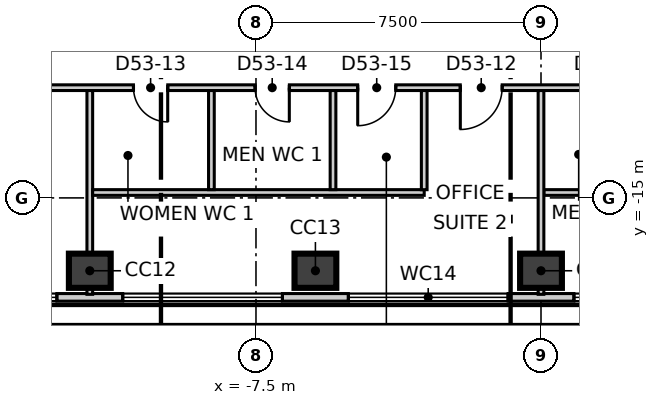
"""IFC4 building model, lengths in metres.
Left out: names, types, materials, properties, quantities, classifications, styles, units other than length and angle.
Written with IfcOpenShell. Run it as: python <this file> out.ifc"""

import sys

from ifc_helpers import new_model, si_unit, direction, frame, frame_2d, origin, origin_2d, place, context, subcontext, project, spatial, rectangle, extrude, element, fill, save


model = new_model("IFC4")
c1 = context("Model", 3, precision=1e-05, world=origin(), true_north=direction((0.0, 1.0)))
c2 = subcontext(c1, "Body", "Model", "MODEL_VIEW")
j1 = project(units=[si_unit("LENGTHUNIT", "METRE"), si_unit("PLANEANGLEUNIT", "RADIAN")], contexts=[c1])
p1 = place(None, origin())
s1 = spatial("IfcSite", under=j1, at=p1, CompositionType="ELEMENT")
p2 = place(p1, origin())
s2 = spatial("IfcBuilding", under=s1, at=p2, CompositionType="ELEMENT")
p3 = place(p2, frame((0.0, 0.0, 227.3)))
s3 = spatial("IfcBuildingStorey", under=s2, at=p3, CompositionType="ELEMENT", Elevation=227.3)
for number, where, z_axis, x_axis in (
    (1, (-11.873, -16.917, -0.3), (0.0, 0.0, 1.0), (1.0, 0.0, 0.0)),
    (2, (-5.936, -16.917, -0.3), (0.0, 0.0, 1.0), (1.0, 0.0, 0.0)),
    (3, (0.0, -16.917, -0.3), (0.0, 0.0, 1.0), (1.0, 0.0, 0.0)),
):
    element("IfcColumn", number, at=place(p3, frame(where, z_axis=z_axis, x_axis=x_axis)), inside=s3, PredefinedType="COLUMN", context=c2, shape_type="SweptSolid", body=[
        extrude(rectangle(XDim=1.1, YDim=0.9, at=origin_2d()), origin(), (0.0, 0.0, 1.0), 4.0),
    ])
p4 = place(p3, frame((-2.732, 30.501, 0.0), z_axis=(0.0, 0.0, 1.0), x_axis=(-0.500023345841, -0.866011924637, 0.0)))
e4 = element("IfcWall", 4, at=p4, inside=s3, PredefinedType="ELEMENTEDWALL", context=c2, shape_type="SweptSolid", body=[
    extrude(rectangle(XDim=50.078, YDim=0.2, at=frame_2d((25.039, 0.0))), origin(), (0.0, 0.0, 1.0), 3.7),
])
p5 = place(p4, frame((2.171, 0.0, 0.9)))
e5 = element("IfcOpeningElement", 5, at=p5, cuts=e4, PredefinedType="OPENING", context=c2, shape_type="SweptSolid", body=[
    extrude(rectangle(XDim=4.2, YDim=2.5, at=frame_2d((2.1, 1.25))), frame((0.0, 0.11, 0.0), z_axis=(0.0, -1.0, 0.0), x_axis=(1.0, 0.0, 0.0)), (0.0, 0.0, 1.0), 0.22),
])
p6 = place(p4, frame((8.107, 0.0, 0.9)))
e6 = element("IfcOpeningElement", 6, at=p6, cuts=e4, PredefinedType="OPENING", context=c2, shape_type="SweptSolid", body=[
    extrude(rectangle(XDim=4.2, YDim=2.5, at=frame_2d((2.1, 1.25))), frame((0.0, 0.11, 0.0), z_axis=(0.0, -1.0, 0.0), x_axis=(1.0, 0.0, 0.0)), (0.0, 0.0, 1.0), 0.22),
])
p7 = place(p4, frame((14.044, 0.0, 0.9)))
e7 = element("IfcOpeningElement", 7, at=p7, cuts=e4, PredefinedType="OPENING", context=c2, shape_type="SweptSolid", body=[
    extrude(rectangle(XDim=4.2, YDim=2.5, at=frame_2d((2.1, 1.25))), frame((0.0, 0.11, 0.0), z_axis=(0.0, -1.0, 0.0), x_axis=(1.0, 0.0, 0.0)), (0.0, 0.0, 1.0), 0.22),
])
p8 = place(p4, frame((19.98, 0.0, 0.9)))
e8 = element("IfcOpeningElement", 8, at=p8, cuts=e4, PredefinedType="OPENING", context=c2, shape_type="SweptSolid", body=[
    extrude(rectangle(XDim=4.2, YDim=2.5, at=frame_2d((2.1, 1.25))), frame((0.0, 0.11, 0.0), z_axis=(0.0, -1.0, 0.0), x_axis=(1.0, 0.0, 0.0)), (0.0, 0.0, 1.0), 0.22),
])
p9 = place(p4, frame((25.917, 0.0, 0.9)))
e9 = element("IfcOpeningElement", 9, at=p9, cuts=e4, PredefinedType="OPENING", context=c2, shape_type="SweptSolid", body=[
    extrude(rectangle(XDim=4.2, YDim=2.5, at=frame_2d((2.1, 1.25))), frame((0.0, 0.11, 0.0), z_axis=(0.0, -1.0, 0.0), x_axis=(1.0, 0.0, 0.0)), (0.0, 0.0, 1.0), 0.22),
])
p10 = place(p4, frame((31.853, 0.0, 0.9)))
e10 = element("IfcOpeningElement", 10, at=p10, cuts=e4, PredefinedType="OPENING", context=c2, shape_type="SweptSolid", body=[
    extrude(rectangle(XDim=4.2, YDim=2.5, at=frame_2d((2.1, 1.25))), frame((0.0, 0.11, 0.0), z_axis=(0.0, -1.0, 0.0), x_axis=(1.0, 0.0, 0.0)), (0.0, 0.0, 1.0), 0.22),
])
p11 = place(p4, frame((37.79, 0.0, 0.9)))
e11 = element("IfcOpeningElement", 11, at=p11, cuts=e4, PredefinedType="OPENING", context=c2, shape_type="SweptSolid", body=[
    extrude(rectangle(XDim=4.2, YDim=2.5, at=frame_2d((2.1, 1.25))), frame((0.0, 0.11, 0.0), z_axis=(0.0, -1.0, 0.0), x_axis=(1.0, 0.0, 0.0)), (0.0, 0.0, 1.0), 0.22),
])
p12 = place(p4, frame((43.726, 0.0, 0.9)))
e12 = element("IfcOpeningElement", 12, at=p12, cuts=e4, PredefinedType="OPENING", context=c2, shape_type="SweptSolid", body=[
    extrude(rectangle(XDim=4.2, YDim=2.5, at=frame_2d((2.1, 1.25))), frame((0.0, 0.11, 0.0), z_axis=(0.0, -1.0, 0.0), x_axis=(1.0, 0.0, 0.0)), (0.0, 0.0, 1.0), 0.22),
])
p13 = place(p3, frame((-25.049, -17.617, 0.0), z_axis=(0.0, 0.0, 1.0), x_axis=(1.0, 0.0, 0.0)))
e13 = element("IfcWall", 13, at=p13, inside=s3, PredefinedType="ELEMENTEDWALL", context=c2, shape_type="SweptSolid", body=[
    extrude(rectangle(XDim=50.078, YDim=0.2, at=frame_2d((25.039, 0.0))), origin(), (0.0, 0.0, 1.0), 3.7),
])
p14 = place(p13, frame((2.171, 0.0, 0.9)))
e14 = element("IfcOpeningElement", 14, at=p14, cuts=e13, PredefinedType="OPENING", context=c2, shape_type="SweptSolid", body=[
    extrude(rectangle(XDim=4.2, YDim=2.5, at=frame_2d((2.1, 1.25))), frame((0.0, 0.11, 0.0), z_axis=(0.0, -1.0, 0.0), x_axis=(1.0, 0.0, 0.0)), (0.0, 0.0, 1.0), 0.22),
])
p15 = place(p13, frame((8.108, 0.0, 0.9)))
e15 = element("IfcOpeningElement", 15, at=p15, cuts=e13, PredefinedType="OPENING", context=c2, shape_type="SweptSolid", body=[
    extrude(rectangle(XDim=4.2, YDim=2.5, at=frame_2d((2.1, 1.25))), frame((0.0, 0.11, 0.0), z_axis=(0.0, -1.0, 0.0), x_axis=(1.0, 0.0, 0.0)), (0.0, 0.0, 1.0), 0.22),
])
p16 = place(p13, frame((14.044, 0.0, 0.9)))
e16 = element("IfcOpeningElement", 16, at=p16, cuts=e13, PredefinedType="OPENING", context=c2, shape_type="SweptSolid", body=[
    extrude(rectangle(XDim=4.2, YDim=2.5, at=frame_2d((2.1, 1.25))), frame((0.0, 0.11, 0.0), z_axis=(0.0, -1.0, 0.0), x_axis=(1.0, 0.0, 0.0)), (0.0, 0.0, 1.0), 0.22),
])
p17 = place(p13, frame((19.981, 0.0, 0.9)))
e17 = element("IfcOpeningElement", 17, at=p17, cuts=e13, PredefinedType="OPENING", context=c2, shape_type="SweptSolid", body=[
    extrude(rectangle(XDim=4.2, YDim=2.5, at=frame_2d((2.1, 1.25))), frame((0.0, 0.11, 0.0), z_axis=(0.0, -1.0, 0.0), x_axis=(1.0, 0.0, 0.0)), (0.0, 0.0, 1.0), 0.22),
])
p18 = place(p13, frame((25.917, 0.0, 0.9)))
e18 = element("IfcOpeningElement", 18, at=p18, cuts=e13, PredefinedType="OPENING", context=c2, shape_type="SweptSolid", body=[
    extrude(rectangle(XDim=4.2, YDim=2.5, at=frame_2d((2.1, 1.25))), frame((0.0, 0.11, 0.0), z_axis=(0.0, -1.0, 0.0), x_axis=(1.0, 0.0, 0.0)), (0.0, 0.0, 1.0), 0.22),
])
p19 = place(p13, frame((31.854, 0.0, 0.9)))
e19 = element("IfcOpeningElement", 19, at=p19, cuts=e13, PredefinedType="OPENING", context=c2, shape_type="SweptSolid", body=[
    extrude(rectangle(XDim=4.2, YDim=2.5, at=frame_2d((2.1, 1.25))), frame((0.0, 0.11, 0.0), z_axis=(0.0, -1.0, 0.0), x_axis=(1.0, 0.0, 0.0)), (0.0, 0.0, 1.0), 0.22),
])
p20 = place(p13, frame((37.79, 0.0, 0.9)))
e20 = element("IfcOpeningElement", 20, at=p20, cuts=e13, PredefinedType="OPENING", context=c2, shape_type="SweptSolid", body=[
    extrude(rectangle(XDim=4.2, YDim=2.5, at=frame_2d((2.1, 1.25))), frame((0.0, 0.11, 0.0), z_axis=(0.0, -1.0, 0.0), x_axis=(1.0, 0.0, 0.0)), (0.0, 0.0, 1.0), 0.22),
])
p21 = place(p13, frame((43.727, 0.0, 0.9)))
e21 = element("IfcOpeningElement", 21, at=p21, cuts=e13, PredefinedType="OPENING", context=c2, shape_type="SweptSolid", body=[
    extrude(rectangle(XDim=4.2, YDim=2.5, at=frame_2d((2.1, 1.25))), frame((0.0, 0.11, 0.0), z_axis=(0.0, -1.0, 0.0), x_axis=(1.0, 0.0, 0.0)), (0.0, 0.0, 1.0), 0.22),
])
p22 = place(p3, frame((-20.882, -11.969, 0.0), z_axis=(0.0, 0.0, 1.0), x_axis=(0.499998738735, 0.866026131975, 0.0)))
e22 = element("IfcWall", 22, at=p22, inside=s3, PredefinedType="PARTITIONING", context=c2, shape_type="SweptSolid", body=[
    extrude(rectangle(XDim=41.764, YDim=0.15, at=frame_2d((20.882, 0.0))), origin(), (0.0, 0.0, 1.0), 3.7),
])
p23 = place(p22, frame((33.714, 0.0, 0.0)))
e23 = element("IfcOpeningElement", 23, at=p23, cuts=e22, PredefinedType="OPENING", context=c2, shape_type="SweptSolid", body=[
    extrude(rectangle(XDim=1.1, YDim=2.1, at=frame_2d((0.55, 1.05))), frame((0.0, 0.085, 0.0), z_axis=(0.0, -1.0, 0.0), x_axis=(1.0, 0.0, 0.0)), (0.0, 0.0, 1.0), 0.17),
])
p24 = place(p22, frame((23.293, 0.0, 0.0)))
e24 = element("IfcOpeningElement", 24, at=p24, cuts=e22, PredefinedType="OPENING", context=c2, shape_type="SweptSolid", body=[
    extrude(rectangle(XDim=1.0, YDim=2.1, at=frame_2d((0.5, 1.05))), frame((0.0, 0.085, 0.0), z_axis=(0.0, -1.0, 0.0), x_axis=(1.0, 0.0, 0.0)), (0.0, 0.0, 1.0), 0.17),
])
p25 = place(p22, frame((13.356, 0.0, 0.0)))
e25 = element("IfcOpeningElement", 25, at=p25, cuts=e22, PredefinedType="OPENING", context=c2, shape_type="SweptSolid", body=[
    extrude(rectangle(XDim=1.1, YDim=2.1, at=frame_2d((0.55, 1.05))), frame((0.0, 0.085, 0.0), z_axis=(0.0, -1.0, 0.0), x_axis=(1.0, 0.0, 0.0)), (0.0, 0.0, 1.0), 0.17),
])
p26 = place(p22, frame((18.556, 0.0, 0.0)))
e26 = element("IfcOpeningElement", 26, at=p26, cuts=e22, PredefinedType="OPENING", context=c2, shape_type="SweptSolid", body=[
    extrude(rectangle(XDim=0.9, YDim=2.1, at=frame_2d((0.45, 1.05))), frame((0.0, 0.085, 0.0), z_axis=(0.0, -1.0, 0.0), x_axis=(1.0, 0.0, 0.0)), (0.0, 0.0, 1.0), 0.17),
])
p27 = place(p22, frame((15.556, 0.0, 0.0)))
e27 = element("IfcOpeningElement", 27, at=p27, cuts=e22, PredefinedType="OPENING", context=c2, shape_type="SweptSolid", body=[
    extrude(rectangle(XDim=0.9, YDim=2.1, at=frame_2d((0.45, 1.05))), frame((0.0, 0.085, 0.0), z_axis=(0.0, -1.0, 0.0), x_axis=(1.0, 0.0, 0.0)), (0.0, 0.0, 1.0), 0.17),
])
p28 = place(p22, frame((3.883, 0.0, 0.0)))
e28 = element("IfcOpeningElement", 28, at=p28, cuts=e22, PredefinedType="OPENING", context=c2, shape_type="SweptSolid", body=[
    extrude(rectangle(XDim=1.1, YDim=2.1, at=frame_2d((0.55, 1.05))), frame((0.0, 0.085, 0.0), z_axis=(0.0, -1.0, 0.0), x_axis=(1.0, 0.0, 0.0)), (0.0, 0.0, 1.0), 0.17),
])
p29 = place(p3, frame((-20.808, -12.1, 0.0), z_axis=(0.0, 0.0, 1.0), x_axis=(1.0, 0.0, 0.0)))
e29 = element("IfcWall", 29, at=p29, inside=s3, PredefinedType="PARTITIONING", context=c2, shape_type="SweptSolid", body=[
    extrude(rectangle(XDim=41.766, YDim=0.15, at=frame_2d((20.883, 0.0))), origin(), (0.0, 0.0, 1.0), 3.7),
])
p30 = place(p29, frame((3.8, 0.0, 0.0)))
e30 = element("IfcOpeningElement", 30, at=p30, cuts=e29, PredefinedType="OPENING", context=c2, shape_type="SweptSolid", body=[
    extrude(rectangle(XDim=1.1, YDim=2.1, at=frame_2d((0.55, 1.05))), frame((0.0, 0.085, 0.0), z_axis=(0.0, -1.0, 0.0), x_axis=(1.0, 0.0, 0.0)), (0.0, 0.0, 1.0), 0.17),
])
p31 = place(p29, frame((18.685, 0.0, 0.0)))
e31 = element("IfcOpeningElement", 31, at=p31, cuts=e29, PredefinedType="OPENING", context=c2, shape_type="SweptSolid", body=[
    extrude(rectangle(XDim=1.1, YDim=2.1, at=frame_2d((0.55, 1.05))), frame((0.0, 0.085, 0.0), z_axis=(0.0, -1.0, 0.0), x_axis=(1.0, 0.0, 0.0)), (0.0, 0.0, 1.0), 0.17),
])
p32 = place(p29, frame((10.085, 0.0, 0.0)))
e32 = element("IfcOpeningElement", 32, at=p32, cuts=e29, PredefinedType="OPENING", context=c2, shape_type="SweptSolid", body=[
    extrude(rectangle(XDim=0.9, YDim=2.1, at=frame_2d((0.45, 1.05))), frame((0.0, 0.085, 0.0), z_axis=(0.0, -1.0, 0.0), x_axis=(1.0, 0.0, 0.0)), (0.0, 0.0, 1.0), 0.17),
])
p33 = place(p29, frame((13.285, 0.0, 0.0)))
e33 = element("IfcOpeningElement", 33, at=p33, cuts=e29, PredefinedType="OPENING", context=c2, shape_type="SweptSolid", body=[
    extrude(rectangle(XDim=0.9, YDim=2.1, at=frame_2d((0.45, 1.05))), frame((0.0, 0.085, 0.0), z_axis=(0.0, -1.0, 0.0), x_axis=(1.0, 0.0, 0.0)), (0.0, 0.0, 1.0), 0.17),
])
p34 = place(p29, frame((15.985, 0.0, 0.0)))
e34 = element("IfcOpeningElement", 34, at=p34, cuts=e29, PredefinedType="OPENING", context=c2, shape_type="SweptSolid", body=[
    extrude(rectangle(XDim=1.0, YDim=2.1, at=frame_2d((0.5, 1.05))), frame((0.0, 0.085, 0.0), z_axis=(0.0, -1.0, 0.0), x_axis=(1.0, 0.0, 0.0)), (0.0, 0.0, 1.0), 0.17),
])
p35 = place(p29, frame((29.158, 0.0, 0.0)))
e35 = element("IfcOpeningElement", 35, at=p35, cuts=e29, PredefinedType="OPENING", context=c2, shape_type="SweptSolid", body=[
    extrude(rectangle(XDim=1.1, YDim=2.1, at=frame_2d((0.55, 1.05))), frame((0.0, 0.085, 0.0), z_axis=(0.0, -1.0, 0.0), x_axis=(1.0, 0.0, 0.0)), (0.0, 0.0, 1.0), 0.17),
])
p36 = place(p29, frame((22.158, 0.0, 0.0)))
e36 = element("IfcOpeningElement", 36, at=p36, cuts=e29, PredefinedType="OPENING", context=c2, shape_type="SweptSolid", body=[
    extrude(rectangle(XDim=0.9, YDim=2.1, at=frame_2d((0.45, 1.05))), frame((0.0, 0.085, 0.0), z_axis=(0.0, -1.0, 0.0), x_axis=(1.0, 0.0, 0.0)), (0.0, 0.0, 1.0), 0.17),
])
p37 = place(p29, frame((25.158, 0.0, 0.0)))
e37 = element("IfcOpeningElement", 37, at=p37, cuts=e29, PredefinedType="OPENING", context=c2, shape_type="SweptSolid", body=[
    extrude(rectangle(XDim=0.9, YDim=2.1, at=frame_2d((0.45, 1.05))), frame((0.0, 0.085, 0.0), z_axis=(0.0, -1.0, 0.0), x_axis=(1.0, 0.0, 0.0)), (0.0, 0.0, 1.0), 0.17),
])
p38 = place(p29, frame((36.731, 0.0, 0.0)))
e38 = element("IfcOpeningElement", 38, at=p38, cuts=e29, PredefinedType="OPENING", context=c2, shape_type="SweptSolid", body=[
    extrude(rectangle(XDim=1.0, YDim=2.1, at=frame_2d((0.5, 1.05))), frame((0.0, 0.085, 0.0), z_axis=(0.0, -1.0, 0.0), x_axis=(1.0, 0.0, 0.0)), (0.0, 0.0, 1.0), 0.17),
])
p39 = place(p3, frame((-11.873, -17.537, 0.0), z_axis=(0.0, 0.0, 1.0), x_axis=(0.0, 1.0, 0.0)))
e39 = element("IfcWall", 39, at=p39, inside=s3, PredefinedType="PARTITIONING", context=c2, shape_type="SweptSolid", body=[
    extrude(rectangle(XDim=5.362, YDim=0.15, at=frame_2d((2.681, 0.0))), origin(), (0.0, 0.0, 1.0), 3.7),
])
p40 = place(p3, frame((-11.798, -14.858, 0.0), z_axis=(0.0, 0.0, 1.0), x_axis=(1.0, 0.0, 0.0)))
e40 = element("IfcWall", 40, at=p40, inside=s3, PredefinedType="PARTITIONING", context=c2, shape_type="SweptSolid", body=[
    extrude(rectangle(XDim=8.725, YDim=0.15, at=frame_2d((4.363, 0.0))), origin(), (0.0, 0.0, 1.0), 3.7),
])
p41 = place(p3, frame((0.075, -14.858, 0.0), z_axis=(0.0, 0.0, 1.0), x_axis=(1.0, 0.0, 0.0)))
e41 = element("IfcWall", 41, at=p41, inside=s3, PredefinedType="PARTITIONING", context=c2, shape_type="SweptSolid", body=[
    extrude(rectangle(XDim=5.925, YDim=0.15, at=frame_2d((2.962, 0.0))), origin(), (0.0, 0.0, 1.0), 3.7),
])
p42 = place(p3, frame((-8.673, -14.783, 0.0), z_axis=(0.0, 0.0, 1.0), x_axis=(0.0, 1.0, 0.0)))
e42 = element("IfcWall", 42, at=p42, inside=s3, PredefinedType="PARTITIONING", context=c2, shape_type="SweptSolid", body=[
    extrude(rectangle(XDim=2.608, YDim=0.15, at=frame_2d((1.304, 0.0))), origin(), (0.0, 0.0, 1.0), 3.7),
])
p43 = place(p3, frame((-3.073, -14.784, 0.0), z_axis=(0.0, 0.0, 1.0), x_axis=(0.0, 1.0, 0.0)))
e43 = element("IfcWall", 43, at=p43, inside=s3, PredefinedType="PARTITIONING", context=c2, shape_type="SweptSolid", body=[
    extrude(rectangle(XDim=2.609, YDim=0.15, at=frame_2d((1.304, 0.0))), origin(), (0.0, 0.0, 1.0), 3.7),
])
p44 = place(p3, frame((-5.473, -14.783, 0.0), z_axis=(0.0, 0.0, 1.0), x_axis=(0.0, 1.0, 0.0)))
e44 = element("IfcWall", 44, at=p44, inside=s3, PredefinedType="PARTITIONING", context=c2, shape_type="SweptSolid", body=[
    extrude(rectangle(XDim=2.608, YDim=0.15, at=frame_2d((1.304, 0.0))), origin(), (0.0, 0.0, 1.0), 3.7),
])
p45 = place(p3, frame((0.0, -17.537, 0.0), z_axis=(0.0, 0.0, 1.0), x_axis=(0.0, 1.0, 0.0)))
e45 = element("IfcWall", 45, at=p45, inside=s3, PredefinedType="PARTITIONING", context=c2, shape_type="SweptSolid", body=[
    extrude(rectangle(XDim=5.362, YDim=0.15, at=frame_2d((2.681, 0.0))), origin(), (0.0, 0.0, 1.0), 3.2),
])
p46 = place(p3, frame((0.075, 24.07, 0.0), z_axis=(0.0, 0.0, 1.0), x_axis=(0.49999939571, -0.866025752671, 0.0)))
e46 = element("IfcWall", 46, at=p46, inside=s3, PredefinedType="PARTITIONING", context=c2, shape_type="SweptSolid", body=[
    extrude(rectangle(XDim=41.614, YDim=0.15, at=frame_2d((20.807, 0.0))), origin(), (0.0, 0.0, 1.0), 3.7),
])
p47 = place(p46, frame((36.714, 0.0, 0.0)))
e47 = element("IfcOpeningElement", 47, at=p47, cuts=e46, PredefinedType="OPENING", context=c2, shape_type="SweptSolid", body=[
    extrude(rectangle(XDim=1.1, YDim=2.1, at=frame_2d((0.55, 1.05))), frame((0.0, 0.085, 0.0), z_axis=(0.0, -1.0, 0.0), x_axis=(1.0, 0.0, 0.0)), (0.0, 0.0, 1.0), 0.17),
])
p48 = place(p46, frame((21.831, 0.0, 0.0)))
e48 = element("IfcOpeningElement", 48, at=p48, cuts=e46, PredefinedType="OPENING", context=c2, shape_type="SweptSolid", body=[
    extrude(rectangle(XDim=1.1, YDim=2.1, at=frame_2d((0.55, 1.05))), frame((0.0, 0.085, 0.0), z_axis=(0.0, -1.0, 0.0), x_axis=(1.0, 0.0, 0.0)), (0.0, 0.0, 1.0), 0.17),
])
p49 = place(p46, frame((30.631, 0.0, 0.0)))
e49 = element("IfcOpeningElement", 49, at=p49, cuts=e46, PredefinedType="OPENING", context=c2, shape_type="SweptSolid", body=[
    extrude(rectangle(XDim=0.9, YDim=2.1, at=frame_2d((0.45, 1.05))), frame((0.0, 0.085, 0.0), z_axis=(0.0, -1.0, 0.0), x_axis=(1.0, 0.0, 0.0)), (0.0, 0.0, 1.0), 0.17),
])
p50 = place(p46, frame((27.431, 0.0, 0.0)))
e50 = element("IfcOpeningElement", 50, at=p50, cuts=e46, PredefinedType="OPENING", context=c2, shape_type="SweptSolid", body=[
    extrude(rectangle(XDim=0.9, YDim=2.1, at=frame_2d((0.45, 1.05))), frame((0.0, 0.085, 0.0), z_axis=(0.0, -1.0, 0.0), x_axis=(1.0, 0.0, 0.0)), (0.0, 0.0, 1.0), 0.17),
])
p51 = place(p46, frame((24.631, 0.0, 0.0)))
e51 = element("IfcOpeningElement", 51, at=p51, cuts=e46, PredefinedType="OPENING", context=c2, shape_type="SweptSolid", body=[
    extrude(rectangle(XDim=1.0, YDim=2.1, at=frame_2d((0.5, 1.05))), frame((0.0, 0.085, 0.0), z_axis=(0.0, -1.0, 0.0), x_axis=(1.0, 0.0, 0.0)), (0.0, 0.0, 1.0), 0.17),
])
p52 = place(p46, frame((14.358, 0.0, 0.0)))
e52 = element("IfcOpeningElement", 52, at=p52, cuts=e46, PredefinedType="OPENING", context=c2, shape_type="SweptSolid", body=[
    extrude(rectangle(XDim=1.1, YDim=2.1, at=frame_2d((0.55, 1.05))), frame((0.0, 0.085, 0.0), z_axis=(0.0, -1.0, 0.0), x_axis=(1.0, 0.0, 0.0)), (0.0, 0.0, 1.0), 0.17),
])
p53 = place(p46, frame((3.885, 0.0, 0.0)))
e53 = element("IfcOpeningElement", 53, at=p53, cuts=e46, PredefinedType="OPENING", context=c2, shape_type="SweptSolid", body=[
    extrude(rectangle(XDim=1.1, YDim=2.1, at=frame_2d((0.55, 1.05))), frame((0.0, 0.085, 0.0), z_axis=(0.0, -1.0, 0.0), x_axis=(1.0, 0.0, 0.0)), (0.0, 0.0, 1.0), 0.17),
])
p54 = place(p15, origin())
e54 = element("IfcWindow", 54, at=p54, inside=s3, PartitioningType="SINGLE_PANEL", PredefinedType="WINDOW", context=c2, shape_type="SweptSolid", body=[
    extrude(rectangle(XDim=4.2, YDim=2.5, at=frame_2d((2.1, 1.25))), frame((0.0, 0.03, 0.0), z_axis=(0.0, -1.0, 0.0), x_axis=(1.0, 0.0, 0.0)), (0.0, 0.0, 1.0), 0.06),
])
fill(e15, e54)
p55 = place(p16, origin())
e55 = element("IfcWindow", 55, at=p55, inside=s3, PartitioningType="SINGLE_PANEL", PredefinedType="WINDOW", context=c2, shape_type="SweptSolid", body=[
    extrude(rectangle(XDim=4.2, YDim=2.5, at=frame_2d((2.1, 1.25))), frame((0.0, 0.03, 0.0), z_axis=(0.0, -1.0, 0.0), x_axis=(1.0, 0.0, 0.0)), (0.0, 0.0, 1.0), 0.06),
])
fill(e16, e55)
p56 = place(p17, origin())
e56 = element("IfcWindow", 56, at=p56, inside=s3, PartitioningType="SINGLE_PANEL", PredefinedType="WINDOW", context=c2, shape_type="SweptSolid", body=[
    extrude(rectangle(XDim=4.2, YDim=2.5, at=frame_2d((2.1, 1.25))), frame((0.0, 0.03, 0.0), z_axis=(0.0, -1.0, 0.0), x_axis=(1.0, 0.0, 0.0)), (0.0, 0.0, 1.0), 0.06),
])
fill(e17, e56)
p57 = place(p18, origin())
e57 = element("IfcWindow", 57, at=p57, inside=s3, PartitioningType="SINGLE_PANEL", PredefinedType="WINDOW", context=c2, shape_type="SweptSolid", body=[
    extrude(rectangle(XDim=4.2, YDim=2.5, at=frame_2d((2.1, 1.25))), frame((0.0, 0.03, 0.0), z_axis=(0.0, -1.0, 0.0), x_axis=(1.0, 0.0, 0.0)), (0.0, 0.0, 1.0), 0.06),
])
fill(e18, e57)
p58 = place(p31, origin())
e58 = element("IfcDoor", 58, at=p58, inside=s3, OperationType="SINGLE_SWING_LEFT", PredefinedType="DOOR", context=c2, shape_type="SweptSolid", body=[
    extrude(rectangle(XDim=1.1, YDim=2.1, at=frame_2d((0.55, 1.05))), frame((0.0, 0.025, 0.0), z_axis=(0.0, -1.0, 0.0), x_axis=(1.0, 0.0, 0.0)), (0.0, 0.0, 1.0), 0.05),
])
fill(e31, e58)
p59 = place(p32, origin())
e59 = element("IfcDoor", 59, at=p59, inside=s3, OperationType="SINGLE_SWING_RIGHT", PredefinedType="DOOR", context=c2, shape_type="SweptSolid", body=[
    extrude(rectangle(XDim=0.9, YDim=2.1, at=frame_2d((0.45, 1.05))), frame((0.0, 0.025, 0.0), z_axis=(0.0, -1.0, 0.0), x_axis=(1.0, 0.0, 0.0)), (0.0, 0.0, 1.0), 0.05),
])
fill(e32, e59)
p60 = place(p33, origin())
e60 = element("IfcDoor", 60, at=p60, inside=s3, OperationType="SINGLE_SWING_RIGHT", PredefinedType="DOOR", context=c2, shape_type="SweptSolid", body=[
    extrude(rectangle(XDim=0.9, YDim=2.1, at=frame_2d((0.45, 1.05))), frame((0.0, 0.025, 0.0), z_axis=(0.0, -1.0, 0.0), x_axis=(1.0, 0.0, 0.0)), (0.0, 0.0, 1.0), 0.05),
])
fill(e33, e60)
p61 = place(p34, origin())
e61 = element("IfcDoor", 61, at=p61, inside=s3, OperationType="SINGLE_SWING_LEFT", PredefinedType="DOOR", context=c2, shape_type="SweptSolid", body=[
    extrude(rectangle(XDim=1.0, YDim=2.1, at=frame_2d((0.5, 1.05))), frame((0.0, 0.025, 0.0), z_axis=(0.0, -1.0, 0.0), x_axis=(1.0, 0.0, 0.0)), (0.0, 0.0, 1.0), 0.05),
])
fill(e34, e61)
save(model, sys.argv[1])
